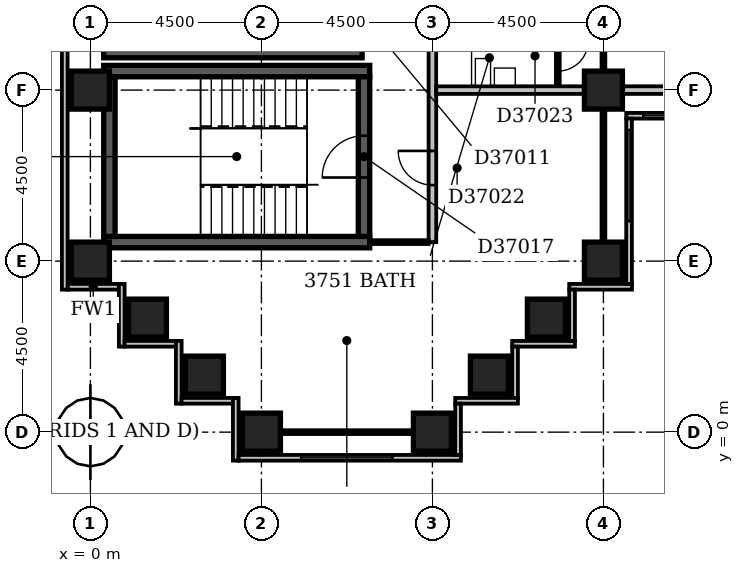
"""IFC4 building model, lengths in metres.
Left out: names, types, materials, properties, quantities, classifications, styles, units other than length and angle.
Written with IfcOpenShell. Run it as: python <this file> out.ifc"""

import sys

from ifc_helpers import new_model, si_unit, direction, frame, frame_2d, origin, origin_2d, place, context, subcontext, project, spatial, rectangle, extrude, element, fill, save


model = new_model("IFC4")
c1 = context("Model", 3, precision=1e-05, world=origin(), true_north=direction((0.0, 1.0)))
c2 = subcontext(c1, "Body", "Model", "MODEL_VIEW")
j1 = project(units=[si_unit("LENGTHUNIT", "METRE"), si_unit("PLANEANGLEUNIT", "RADIAN")], contexts=[c1])
p1 = place(None, origin())
s1 = spatial("IfcSite", under=j1, at=p1, CompositionType="ELEMENT")
p2 = place(p1, origin())
s2 = spatial("IfcBuilding", under=s1, at=p2, CompositionType="ELEMENT")
p3 = place(p2, frame((0.0, 0.0, 148.4)))
s3 = spatial("IfcBuildingStorey", under=s2, at=p3, CompositionType="ELEMENT", Elevation=148.4)
for number, where, z_axis, x_axis in (
    (1, (0.35, 5.0, -0.3), (0.0, 0.0, 1.0), (1.0, 0.0, 0.0)),
    (2, (0.35, 9.5, -0.3), (0.0, 0.0, 1.0), (1.0, 0.0, 0.0)),
):
    element("IfcWall", number, at=place(p3, frame(where, z_axis=z_axis, x_axis=x_axis)), inside=s3, PredefinedType="SHEAR", context=c2, shape_type="SweptSolid", body=[
        extrude(rectangle(XDim=7.0, YDim=0.3, at=frame_2d((3.5, 0.0))), origin(), (0.0, 0.0, 1.0), 3.6),
    ])
p4 = place(p3, frame((0.35, 10.0, -0.3), z_axis=(0.0, 0.0, 1.0), x_axis=(1.0, 0.0, 0.0)))
e3 = element("IfcWall", 3, at=p4, inside=s3, PredefinedType="SHEAR", context=c2, shape_type="SweptSolid", body=[
    extrude(rectangle(XDim=6.8, YDim=0.3, at=frame_2d((3.4, 0.0))), origin(), (0.0, 0.0, 1.0), 3.6),
])
p5 = place(p3, frame((0.5, 5.15, -0.3), z_axis=(0.0, 0.0, 1.0), x_axis=(0.0, 1.0, 0.0)))
e4 = element("IfcWall", 4, at=p5, inside=s3, PredefinedType="SHEAR", context=c2, shape_type="SweptSolid", body=[
    extrude(rectangle(XDim=4.2, YDim=0.3, at=frame_2d((2.1, 0.0))), origin(), (0.0, 0.0, 1.0), 3.6),
])
p6 = place(p3, frame((7.2, 5.15, -0.3), z_axis=(0.0, 0.0, 1.0), x_axis=(0.0, 1.0, 0.0)))
e5 = element("IfcWall", 5, at=p6, inside=s3, PredefinedType="SHEAR", context=c2, shape_type="SweptSolid", body=[
    extrude(rectangle(XDim=4.2, YDim=0.3, at=frame_2d((2.1, 0.0))), origin(), (0.0, 0.0, 1.0), 3.6),
])
p7 = place(p6, frame((1.55, 0.0, 0.3)))
e6 = element("IfcOpeningElement", 6, at=p7, cuts=e5, PredefinedType="OPENING", context=c2, shape_type="SweptSolid", body=[
    extrude(rectangle(XDim=1.1, YDim=2.1, at=frame_2d((0.55, 1.05))), frame((0.0, 0.162, 0.0), z_axis=(0.0, -1.0, 0.0), x_axis=(1.0, 0.0, 0.0)), (0.0, 0.0, 1.0), 0.324),
])
for number, where, z_axis, x_axis in (
    (7, (4.5, 0.0, -0.3), (0.0, 0.0, 1.0), (1.0, 0.0, 0.0)),
    (8, (9.0, 0.0, -0.3), (0.0, 0.0, 1.0), (1.0, 0.0, 0.0)),
    (9, (3.0, 1.5, -0.3), (0.0, 0.0, 1.0), (1.0, 0.0, 0.0)),
    (10, (10.5, 1.5, -0.3), (0.0, 0.0, 1.0), (1.0, 0.0, 0.0)),
    (11, (1.5, 3.0, -0.3), (0.0, 0.0, 1.0), (1.0, 0.0, 0.0)),
    (12, (12.0, 3.0, -0.3), (0.0, 0.0, 1.0), (1.0, 0.0, 0.0)),
    (13, (0.0, 4.5, -0.3), (0.0, 0.0, 1.0), (1.0, 0.0, 0.0)),
    (14, (13.5, 4.5, -0.3), (0.0, 0.0, 1.0), (1.0, 0.0, 0.0)),
    (15, (0.0, 9.0, -0.3), (0.0, 0.0, 1.0), (1.0, 0.0, 0.0)),
    (16, (13.5, 9.0, -0.3), (0.0, 0.0, 1.0), (1.0, 0.0, 0.0)),
):
    element("IfcColumn", number, at=place(p3, frame(where, z_axis=z_axis, x_axis=x_axis)), inside=s3, PredefinedType="COLUMN", context=c2, shape_type="SweptSolid", body=[
        extrude(rectangle(XDim=1.0, YDim=1.0, at=origin_2d()), origin(), (0.0, 0.0, 1.0), 3.6),
    ])
p8 = place(p3, frame((9.675, -0.6, 0.0), z_axis=(0.0, 0.0, 1.0), x_axis=(0.0, 1.0, 0.0)))
e17 = element("IfcWall", 17, at=p8, inside=s3, PredefinedType="STANDARD", context=c2, shape_type="SweptSolid", body=[
    extrude(rectangle(XDim=1.35, YDim=0.15, at=frame_2d((0.675, 0.0))), origin(), (0.0, 0.0, 1.0), 2.7),
])
p9 = place(p3, frame((9.6, 0.825, 0.0), z_axis=(0.0, 0.0, 1.0), x_axis=(1.0, 0.0, 0.0)))
e18 = element("IfcWall", 18, at=p9, inside=s3, PredefinedType="STANDARD", context=c2, shape_type="SweptSolid", body=[
    extrude(rectangle(XDim=1.65, YDim=0.15, at=frame_2d((0.825, 0.0))), origin(), (0.0, 0.0, 1.0), 2.7),
])
p10 = place(p3, frame((11.175, 0.9, 0.0), z_axis=(0.0, 0.0, 1.0), x_axis=(0.0, 1.0, 0.0)))
e19 = element("IfcWall", 19, at=p10, inside=s3, PredefinedType="STANDARD", context=c2, shape_type="SweptSolid", body=[
    extrude(rectangle(XDim=1.35, YDim=0.15, at=frame_2d((0.675, 0.0))), origin(), (0.0, 0.0, 1.0), 2.7),
])
p11 = place(p3, frame((11.1, 2.325, 0.0), z_axis=(0.0, 0.0, 1.0), x_axis=(1.0, 0.0, 0.0)))
e20 = element("IfcWall", 20, at=p11, inside=s3, PredefinedType="STANDARD", context=c2, shape_type="SweptSolid", body=[
    extrude(rectangle(XDim=1.65, YDim=0.15, at=frame_2d((0.825, 0.0))), origin(), (0.0, 0.0, 1.0), 2.7),
])
p12 = place(p3, frame((12.675, 2.4, 0.0), z_axis=(0.0, 0.0, 1.0), x_axis=(0.0, 1.0, 0.0)))
e21 = element("IfcWall", 21, at=p12, inside=s3, PredefinedType="STANDARD", context=c2, shape_type="SweptSolid", body=[
    extrude(rectangle(XDim=1.35, YDim=0.15, at=frame_2d((0.675, 0.0))), origin(), (0.0, 0.0, 1.0), 2.7),
])
p13 = place(p3, frame((12.6, 3.825, 0.0), z_axis=(0.0, 0.0, 1.0), x_axis=(1.0, 0.0, 0.0)))
e22 = element("IfcWall", 22, at=p13, inside=s3, PredefinedType="STANDARD", context=c2, shape_type="SweptSolid", body=[
    extrude(rectangle(XDim=1.65, YDim=0.15, at=frame_2d((0.825, 0.0))), origin(), (0.0, 0.0, 1.0), 2.7),
])
p14 = place(p3, frame((14.175, 3.9, 0.0), z_axis=(0.0, 0.0, 1.0), x_axis=(0.0, 1.0, 0.0)))
e23 = element("IfcWall", 23, at=p14, inside=s3, PredefinedType="STANDARD", context=c2, shape_type="SweptSolid", body=[
    extrude(rectangle(XDim=4.35, YDim=0.15, at=frame_2d((2.175, 0.0))), origin(), (0.0, 0.0, 1.0), 2.7),
])
p15 = place(p14, frame((1.65, 0.0, 0.6)))
e24 = element("IfcOpeningElement", 24, at=p15, cuts=e23, PredefinedType="OPENING", context=c2, shape_type="SweptSolid", body=[
    extrude(rectangle(XDim=2.4, YDim=1.8, at=frame_2d((1.2, 0.9))), frame((0.0, 0.087, 0.0), z_axis=(0.0, -1.0, 0.0), x_axis=(1.0, 0.0, 0.0)), (0.0, 0.0, 1.0), 0.174),
])
p16 = place(p3, frame((14.1, 8.325, 0.0), z_axis=(0.0, 0.0, 1.0), x_axis=(1.0, 0.0, 0.0)))
e25 = element("IfcWall", 25, at=p16, inside=s3, PredefinedType="STANDARD", context=c2, shape_type="SweptSolid", body=[
    extrude(rectangle(XDim=4.65, YDim=0.15, at=frame_2d((2.325, 0.0))), origin(), (0.0, 0.0, 1.0), 2.7),
])
p17 = place(p16, frame((0.45, 0.0, 0.6)))
e26 = element("IfcOpeningElement", 26, at=p17, cuts=e25, PredefinedType="OPENING", context=c2, shape_type="SweptSolid", body=[
    extrude(rectangle(XDim=2.4, YDim=1.8, at=frame_2d((1.2, 0.9))), frame((0.0, 0.087, 0.0), z_axis=(0.0, -1.0, 0.0), x_axis=(1.0, 0.0, 0.0)), (0.0, 0.0, 1.0), 0.174),
])
p18 = place(p3, frame((-0.675, 59.1, 0.0), z_axis=(0.0, 0.0, 1.0), x_axis=(0.0, -1.0, 0.0)))
e27 = element("IfcWall", 27, at=p18, inside=s3, PredefinedType="STANDARD", context=c2, shape_type="SweptSolid", body=[
    extrude(rectangle(XDim=55.35, YDim=0.15, at=frame_2d((27.675, 0.0))), origin(), (0.0, 0.0, 1.0), 2.7),
])
p19 = place(p3, frame((-0.6, 3.825, 0.0), z_axis=(0.0, 0.0, 1.0), x_axis=(1.0, 0.0, 0.0)))
e28 = element("IfcWall", 28, at=p19, inside=s3, PredefinedType="STANDARD", context=c2, shape_type="SweptSolid", body=[
    extrude(rectangle(XDim=1.35, YDim=0.15, at=frame_2d((0.675, 0.0))), origin(), (0.0, 0.0, 1.0), 2.7),
])
p20 = place(p3, frame((0.825, 3.9, 0.0), z_axis=(0.0, 0.0, 1.0), x_axis=(0.0, -1.0, 0.0)))
e29 = element("IfcWall", 29, at=p20, inside=s3, PredefinedType="STANDARD", context=c2, shape_type="SweptSolid", body=[
    extrude(rectangle(XDim=1.65, YDim=0.15, at=frame_2d((0.825, 0.0))), origin(), (0.0, 0.0, 1.0), 2.7),
])
p21 = place(p3, frame((0.9, 2.325, 0.0), z_axis=(0.0, 0.0, 1.0), x_axis=(1.0, 0.0, 0.0)))
e30 = element("IfcWall", 30, at=p21, inside=s3, PredefinedType="STANDARD", context=c2, shape_type="SweptSolid", body=[
    extrude(rectangle(XDim=1.35, YDim=0.15, at=frame_2d((0.675, 0.0))), origin(), (0.0, 0.0, 1.0), 2.7),
])
p22 = place(p3, frame((2.325, 2.4, 0.0), z_axis=(0.0, 0.0, 1.0), x_axis=(0.0, -1.0, 0.0)))
e31 = element("IfcWall", 31, at=p22, inside=s3, PredefinedType="STANDARD", context=c2, shape_type="SweptSolid", body=[
    extrude(rectangle(XDim=1.65, YDim=0.15, at=frame_2d((0.825, 0.0))), origin(), (0.0, 0.0, 1.0), 2.7),
])
p23 = place(p3, frame((2.4, 0.825, 0.0), z_axis=(0.0, 0.0, 1.0), x_axis=(1.0, 0.0, 0.0)))
e32 = element("IfcWall", 32, at=p23, inside=s3, PredefinedType="STANDARD", context=c2, shape_type="SweptSolid", body=[
    extrude(rectangle(XDim=1.35, YDim=0.15, at=frame_2d((0.675, 0.0))), origin(), (0.0, 0.0, 1.0), 2.7),
])
p24 = place(p3, frame((3.825, 0.9, 0.0), z_axis=(0.0, 0.0, 1.0), x_axis=(0.0, -1.0, 0.0)))
e33 = element("IfcWall", 33, at=p24, inside=s3, PredefinedType="STANDARD", context=c2, shape_type="SweptSolid", body=[
    extrude(rectangle(XDim=1.65, YDim=0.15, at=frame_2d((0.825, 0.0))), origin(), (0.0, 0.0, 1.0), 2.7),
])
p25 = place(p3, frame((3.9, -0.675, 0.0), z_axis=(0.0, 0.0, 1.0), x_axis=(1.0, 0.0, 0.0)))
e34 = element("IfcWall", 34, at=p25, inside=s3, PredefinedType="STANDARD", context=c2, shape_type="SweptSolid", body=[
    extrude(rectangle(XDim=5.85, YDim=0.15, at=frame_2d((2.925, 0.0))), origin(), (0.0, 0.0, 1.0), 2.7),
])
p26 = place(p25, frame((1.65, 0.0, 0.6)))
e35 = element("IfcOpeningElement", 35, at=p26, cuts=e34, PredefinedType="OPENING", context=c2, shape_type="SweptSolid", body=[
    extrude(rectangle(XDim=2.4, YDim=1.8, at=frame_2d((1.2, 0.9))), frame((0.0, 0.087, 0.0), z_axis=(0.0, -1.0, 0.0), x_axis=(1.0, 0.0, 0.0)), (0.0, 0.0, 1.0), 0.174),
])
p27 = place(p3, frame((5.0, 0.0, 0.0), z_axis=(0.0, 0.0, 1.0), x_axis=(1.0, 0.0, 0.0)))
e36 = element("IfcWall", 36, at=p27, inside=s3, PredefinedType="PARTITIONING", context=c2, shape_type="SweptSolid", body=[
    extrude(rectangle(XDim=3.5, YDim=0.1, at=frame_2d((1.75, 0.0))), origin(), (0.0, 0.0, 1.0), 2.7),
])
p28 = place(p3, frame((0.0, 4.5, 0.0), z_axis=(0.0, 0.0, 1.0), x_axis=(0.0, 1.0, 0.0)))
e37 = element("IfcWall", 37, at=p28, inside=s3, PredefinedType="PARTITIONING", context=c2, shape_type="SweptSolid", body=[
    extrude(rectangle(XDim=0.5, YDim=0.1, at=frame_2d((0.25, 0.0))), origin(), (0.0, 0.0, 1.0), 2.7),
])
p29 = place(p3, frame((7.349, 5.0, 0.0), z_axis=(0.0, 0.0, 1.0), x_axis=(1.0, 0.0, 0.0)))
e38 = element("IfcWall", 38, at=p29, inside=s3, PredefinedType="PARTITIONING", context=c2, shape_type="SweptSolid", body=[
    extrude(rectangle(XDim=1.551, YDim=0.1, at=frame_2d((0.775, 0.0))), origin(), (0.0, 0.0, 1.0), 3.3),
])
p30 = place(p3, frame((9.0, 5.0, 0.0), z_axis=(0.0, 0.0, 1.0), x_axis=(0.0, 1.0, 0.0)))
e39 = element("IfcWall", 39, at=p30, inside=s3, PredefinedType="PARTITIONING", context=c2, shape_type="SweptSolid", body=[
    extrude(rectangle(XDim=27.75, YDim=0.2, at=frame_2d((13.875, 0.0))), origin(), (0.0, 0.0, 1.0), 3.3),
])
p31 = place(p30, frame((22.8, 0.0, 0.0)))
e40 = element("IfcOpeningElement", 40, at=p31, cuts=e39, PredefinedType="OPENING", context=c2, shape_type="SweptSolid", body=[
    extrude(rectangle(XDim=1.0, YDim=2.1, at=frame_2d((0.5, 1.05))), frame((0.0, 0.112, 0.0), z_axis=(0.0, -1.0, 0.0), x_axis=(1.0, 0.0, 0.0)), (0.0, 0.0, 1.0), 0.224),
])
p32 = place(p30, frame((14.95, 0.0, 0.0)))
e41 = element("IfcOpeningElement", 41, at=p32, cuts=e39, PredefinedType="OPENING", context=c2, shape_type="SweptSolid", body=[
    extrude(rectangle(XDim=1.0, YDim=2.1, at=frame_2d((0.5, 1.05))), frame((0.0, 0.112, 0.0), z_axis=(0.0, -1.0, 0.0), x_axis=(1.0, 0.0, 0.0)), (0.0, 0.0, 1.0), 0.224),
])
p33 = place(p30, frame((10.45, 0.0, 0.0)))
e42 = element("IfcOpeningElement", 42, at=p33, cuts=e39, PredefinedType="OPENING", context=c2, shape_type="SweptSolid", body=[
    extrude(rectangle(XDim=1.0, YDim=2.1, at=frame_2d((0.5, 1.05))), frame((0.0, 0.112, 0.0), z_axis=(0.0, -1.0, 0.0), x_axis=(1.0, 0.0, 0.0)), (0.0, 0.0, 1.0), 0.224),
])
p34 = place(p30, frame((5.95, 0.0, 0.0)))
e43 = element("IfcOpeningElement", 43, at=p34, cuts=e39, PredefinedType="OPENING", context=c2, shape_type="SweptSolid", body=[
    extrude(rectangle(XDim=1.0, YDim=2.1, at=frame_2d((0.5, 1.05))), frame((0.0, 0.112, 0.0), z_axis=(0.0, -1.0, 0.0), x_axis=(1.0, 0.0, 0.0)), (0.0, 0.0, 1.0), 0.224),
])
p35 = place(p30, frame((1.5, 0.0, 0.0)))
e44 = element("IfcOpeningElement", 44, at=p35, cuts=e39, PredefinedType="OPENING", context=c2, shape_type="SweptSolid", body=[
    extrude(rectangle(XDim=0.9, YDim=2.1, at=frame_2d((0.45, 1.05))), frame((0.0, 0.112, 0.0), z_axis=(0.0, -1.0, 0.0), x_axis=(1.0, 0.0, 0.0)), (0.0, 0.0, 1.0), 0.224),
])
p36 = place(p3, frame((13.5, 5.0, 0.0), z_axis=(0.0, 0.0, 1.0), x_axis=(0.0, 1.0, 0.0)))
e45 = element("IfcWall", 45, at=p36, inside=s3, PredefinedType="PARTITIONING", context=c2, shape_type="SweptSolid", body=[
    extrude(rectangle(XDim=3.5, YDim=0.1, at=frame_2d((1.75, 0.0))), origin(), (0.0, 0.0, 1.0), 2.7),
])
p37 = place(p3, frame((9.1, 9.0, 0.0), z_axis=(0.0, 0.0, 1.0), x_axis=(1.0, 0.0, 0.0)))
e46 = element("IfcWall", 46, at=p37, inside=s3, PredefinedType="PARTITIONING", context=c2, shape_type="SweptSolid", body=[
    extrude(rectangle(XDim=3.9, YDim=0.2, at=frame_2d((1.95, 0.0))), origin(), (0.0, 0.0, 1.0), 3.3),
])
p38 = place(p3, frame((14.0, 9.0, 0.0), z_axis=(0.0, 0.0, 1.0), x_axis=(1.0, 0.0, 0.0)))
e47 = element("IfcWall", 47, at=p38, inside=s3, PredefinedType="PARTITIONING", context=c2, shape_type="SweptSolid", body=[
    extrude(rectangle(XDim=3.5, YDim=0.2, at=frame_2d((1.75, 0.0))), origin(), (0.0, 0.0, 1.0), 2.7),
])
p39 = place(p3, frame((12.3, 9.1, 0.0), z_axis=(0.0, 0.0, 1.0), x_axis=(0.0, 1.0, 0.0)))
e48 = element("IfcWall", 48, at=p39, inside=s3, PredefinedType="PARTITIONING", context=c2, shape_type="SweptSolid", body=[
    extrude(rectangle(XDim=1.6, YDim=0.1, at=frame_2d((0.8, 0.0))), origin(), (0.0, 0.0, 1.0), 3.3),
])
p40 = place(p39, frame((0.4, 0.0, 0.0)))
e49 = element("IfcOpeningElement", 49, at=p40, cuts=e48, PredefinedType="OPENING", context=c2, shape_type="SweptSolid", body=[
    extrude(rectangle(XDim=0.8, YDim=2.1, at=frame_2d((0.4, 1.05))), frame((0.0, 0.062, 0.0), z_axis=(0.0, -1.0, 0.0), x_axis=(1.0, 0.0, 0.0)), (0.0, 0.0, 1.0), 0.124),
])
p41 = place(p3, frame((13.5, 9.5, 0.0), z_axis=(0.0, 0.0, 1.0), x_axis=(0.0, 1.0, 0.0)))
e50 = element("IfcWall", 50, at=p41, inside=s3, PredefinedType="PARTITIONING", context=c2, shape_type="SweptSolid", body=[
    extrude(rectangle(XDim=8.4, YDim=0.1, at=frame_2d((4.2, 0.0))), origin(), (0.0, 0.0, 1.0), 3.3),
])
p42 = place(p41, frame((5.8, 0.0, 0.0)))
e51 = element("IfcOpeningElement", 51, at=p42, cuts=e50, PredefinedType="OPENING", context=c2, shape_type="SweptSolid", body=[
    extrude(rectangle(XDim=0.9, YDim=2.1, at=frame_2d((0.45, 1.05))), frame((0.0, 0.062, 0.0), z_axis=(0.0, -1.0, 0.0), x_axis=(1.0, 0.0, 0.0)), (0.0, 0.0, 1.0), 0.124),
])
p43 = place(p41, frame((1.3, 0.0, 0.0)))
e52 = element("IfcOpeningElement", 52, at=p43, cuts=e50, PredefinedType="OPENING", context=c2, shape_type="SweptSolid", body=[
    extrude(rectangle(XDim=0.9, YDim=2.1, at=frame_2d((0.45, 1.05))), frame((0.0, 0.062, 0.0), z_axis=(0.0, -1.0, 0.0), x_axis=(1.0, 0.0, 0.0)), (0.0, 0.0, 1.0), 0.124),
])
p44 = place(p15, origin())
e53 = element("IfcWindow", 53, at=p44, inside=s3, PartitioningType="SINGLE_PANEL", PredefinedType="WINDOW", context=c2, shape_type="SweptSolid", body=[
    extrude(rectangle(XDim=2.4, YDim=1.8, at=frame_2d((1.2, 0.9))), frame((0.0, 0.03, 0.0), z_axis=(0.0, -1.0, 0.0), x_axis=(1.0, 0.0, 0.0)), (0.0, 0.0, 1.0), 0.06),
])
fill(e24, e53)
p45 = place(p17, origin())
e54 = element("IfcWindow", 54, at=p45, inside=s3, PartitioningType="SINGLE_PANEL", PredefinedType="WINDOW", context=c2, shape_type="SweptSolid", body=[
    extrude(rectangle(XDim=2.4, YDim=1.8, at=frame_2d((1.2, 0.9))), frame((0.0, 0.03, 0.0), z_axis=(0.0, -1.0, 0.0), x_axis=(1.0, 0.0, 0.0)), (0.0, 0.0, 1.0), 0.06),
])
fill(e26, e54)
p46 = place(p26, origin())
e55 = element("IfcWindow", 55, at=p46, inside=s3, PartitioningType="SINGLE_PANEL", PredefinedType="WINDOW", context=c2, shape_type="SweptSolid", body=[
    extrude(rectangle(XDim=2.4, YDim=1.8, at=frame_2d((1.2, 0.9))), frame((0.0, 0.03, 0.0), z_axis=(0.0, -1.0, 0.0), x_axis=(1.0, 0.0, 0.0)), (0.0, 0.0, 1.0), 0.06),
])
fill(e35, e55)
p47 = place(p7, origin())
e56 = element("IfcDoor", 56, at=p47, inside=s3, OperationType="SINGLE_SWING_LEFT", PredefinedType="DOOR", context=c2, shape_type="SweptSolid", body=[
    extrude(rectangle(XDim=1.1, YDim=2.1, at=frame_2d((0.55, 1.05))), frame((0.0, 0.025, 0.0), z_axis=(0.0, -1.0, 0.0), x_axis=(1.0, 0.0, 0.0)), (0.0, 0.0, 1.0), 0.05),
])
fill(e6, e56)
p48 = place(p35, frame((0.9, 0.0, 0.0), z_axis=(0.0, 0.0, 1.0), x_axis=(-1.0, 0.0, 0.0)))
e57 = element("IfcDoor", 57, at=p48, inside=s3, OperationType="SINGLE_SWING_LEFT", PredefinedType="DOOR", context=c2, shape_type="SweptSolid", body=[
    extrude(rectangle(XDim=0.9, YDim=2.1, at=frame_2d((0.45, 1.05))), frame((0.0, 0.025, 0.0), z_axis=(0.0, -1.0, 0.0), x_axis=(1.0, 0.0, 0.0)), (0.0, 0.0, 1.0), 0.05),
])
fill(e44, e57)
p49 = place(p40, origin())
e58 = element("IfcDoor", 58, at=p49, inside=s3, OperationType="SINGLE_SWING_RIGHT", PredefinedType="DOOR", context=c2, shape_type="SweptSolid", body=[
    extrude(rectangle(XDim=0.8, YDim=2.1, at=frame_2d((0.4, 1.05))), frame((0.0, 0.025, 0.0), z_axis=(0.0, -1.0, 0.0), x_axis=(1.0, 0.0, 0.0)), (0.0, 0.0, 1.0), 0.05),
])
fill(e49, e58)
save(model, sys.argv[1])
